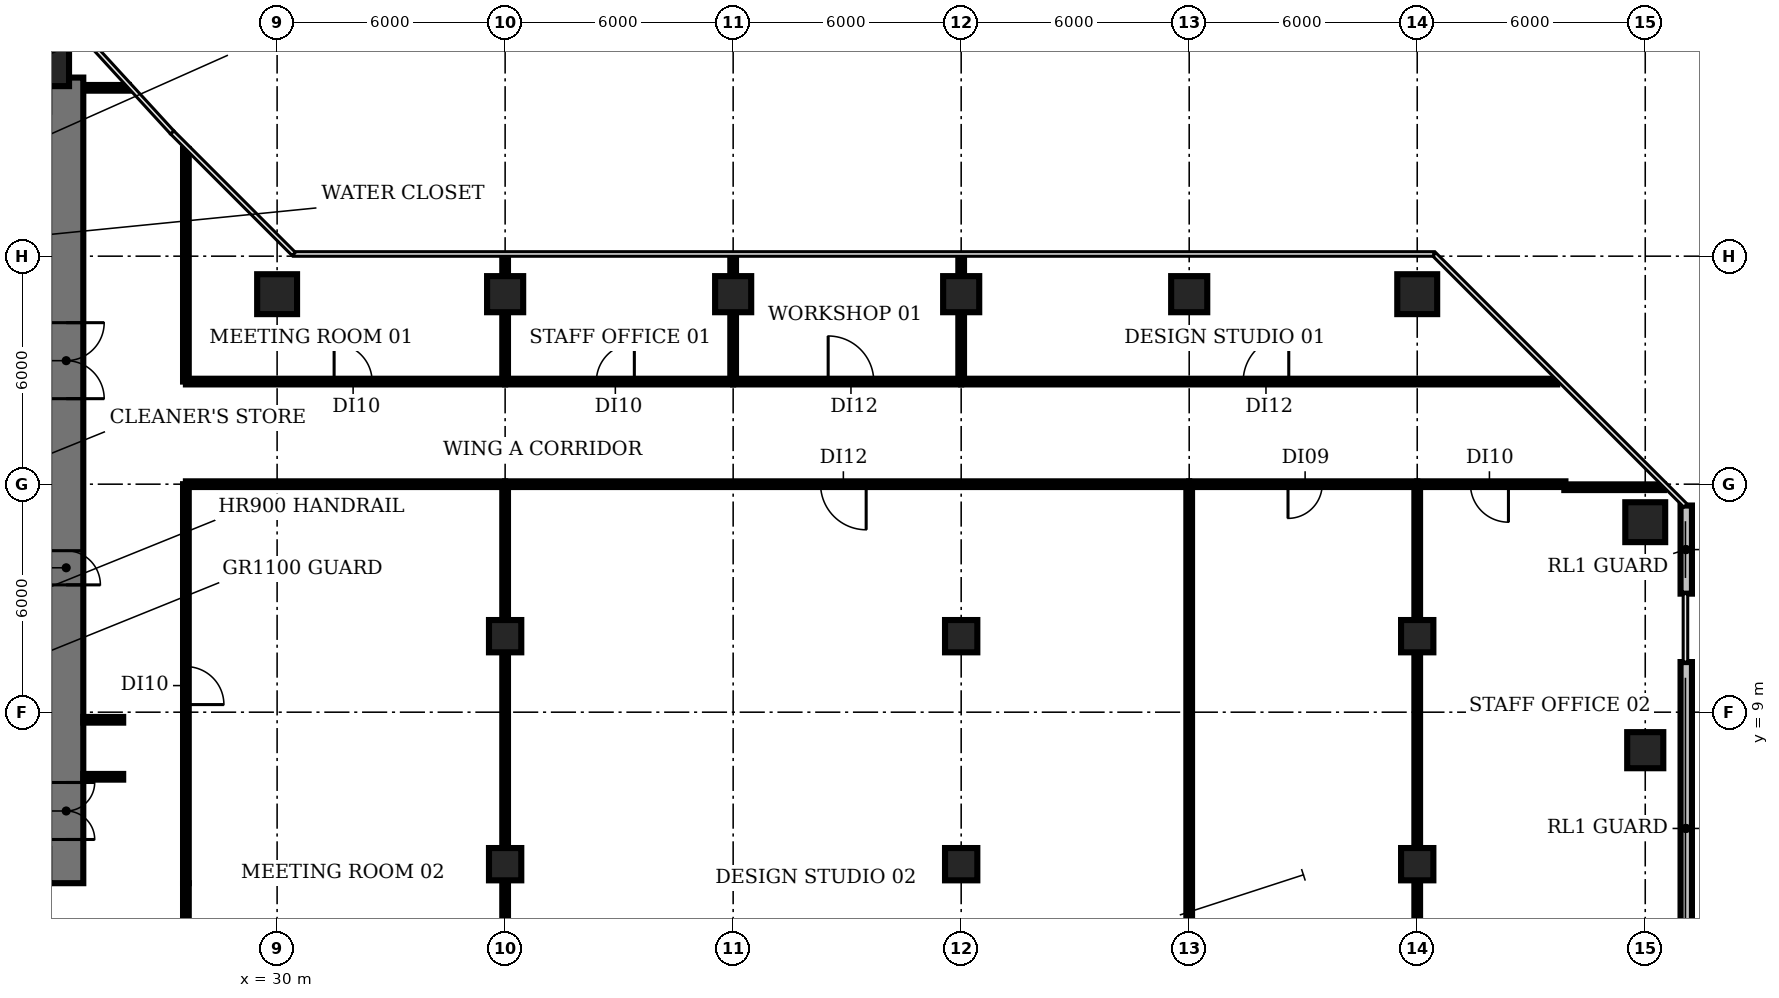
"""IFC4 building model, lengths in metres.
Left out: names, types, materials, properties, quantities, classifications, styles, units other than length and angle.
Written with IfcOpenShell. Run it as: python <this file> out.ifc"""

import sys

from ifc_helpers import new_model, si_unit, direction, frame, frame_2d, origin, origin_2d, place, context, subcontext, project, spatial, rectangle, circle, extrude, element, fill, save


model = new_model("IFC4")
c1 = context("Model", 3, precision=1e-05, world=origin(), true_north=direction((0.0, 1.0)))
c2 = subcontext(c1, "Body", "Model", "MODEL_VIEW")
j1 = project(units=[si_unit("LENGTHUNIT", "METRE"), si_unit("PLANEANGLEUNIT", "RADIAN")], contexts=[c1])
p1 = place(None, origin())
s1 = spatial("IfcSite", under=j1, at=p1, CompositionType="ELEMENT")
p2 = place(p1, origin())
s2 = spatial("IfcBuilding", under=s1, at=p2, CompositionType="ELEMENT")
p3 = place(p2, frame((0.0, 0.0, 41.6)))
s3 = spatial("IfcBuildingStorey", under=s2, at=p3, CompositionType="ELEMENT", Elevation=41.6)
for number, where, z_axis, x_axis in (
    (1, (24.0, 26.0, 0.0), (0.0, 0.0, 1.0), (1.0, 0.0, 0.0)),
    (2, (30.0, 20.0, 0.0), (0.0, 0.0, 1.0), (1.0, 0.0, 0.0)),
):
    element("IfcColumn", number, at=place(p3, frame(where, z_axis=z_axis, x_axis=x_axis)), inside=s3, PredefinedType="COLUMN", context=c2, shape_type="SweptSolid", body=[
        extrude(circle(Radius=0.525, at=origin_2d()), origin(), (0.0, 0.0, 1.0), 3.85),
    ])
for number, where, z_axis, x_axis in (
    (3, (36.0, 5.0, 0.0), (0.0, 0.0, 1.0), (1.0, 0.0, 0.0)),
    (4, (36.0, 11.0, 0.0), (0.0, 0.0, 1.0), (1.0, 0.0, 0.0)),
):
    element("IfcColumn", number, at=place(p3, frame(where, z_axis=z_axis, x_axis=x_axis)), inside=s3, PredefinedType="COLUMN", context=c2, shape_type="SweptSolid", body=[
        extrude(rectangle(XDim=0.85, YDim=0.85, at=origin_2d()), origin(), (0.0, 0.0, 1.0), 3.85),
    ])
for number, where, z_axis, x_axis in (
    (5, (36.0, 20.0, 0.0), (0.0, 0.0, 1.0), (1.0, 0.0, 0.0)),
    (6, (42.0, 20.0, 0.0), (0.0, 0.0, 1.0), (1.0, 0.0, 0.0)),
):
    element("IfcColumn", number, at=place(p3, frame(where, z_axis=z_axis, x_axis=x_axis)), inside=s3, PredefinedType="COLUMN", context=c2, shape_type="SweptSolid", body=[
        extrude(rectangle(XDim=0.95, YDim=0.95, at=origin_2d()), origin(), (0.0, 0.0, 1.0), 3.85),
    ])
for number, where, z_axis, x_axis in (
    (7, (48.0, 5.0, 0.0), (0.0, 0.0, 1.0), (1.0, 0.0, 0.0)),
    (8, (48.0, 11.0, 0.0), (0.0, 0.0, 1.0), (1.0, 0.0, 0.0)),
):
    element("IfcColumn", number, at=place(p3, frame(where, z_axis=z_axis, x_axis=x_axis)), inside=s3, PredefinedType="COLUMN", context=c2, shape_type="SweptSolid", body=[
        extrude(rectangle(XDim=0.85, YDim=0.85, at=origin_2d()), origin(), (0.0, 0.0, 1.0), 3.85),
    ])
for number, where, z_axis, x_axis in (
    (9, (48.0, 20.0, 0.0), (0.0, 0.0, 1.0), (1.0, 0.0, 0.0)),
    (10, (54.0, 20.0, 0.0), (0.0, 0.0, 1.0), (1.0, 0.0, 0.0)),
):
    element("IfcColumn", number, at=place(p3, frame(where, z_axis=z_axis, x_axis=x_axis)), inside=s3, PredefinedType="COLUMN", context=c2, shape_type="SweptSolid", body=[
        extrude(rectangle(XDim=0.95, YDim=0.95, at=origin_2d()), origin(), (0.0, 0.0, 1.0), 3.85),
    ])
for number, where, z_axis, x_axis in (
    (11, (60.0, 5.0, 0.0), (0.0, 0.0, 1.0), (1.0, 0.0, 0.0)),
    (12, (60.0, 11.0, 0.0), (0.0, 0.0, 1.0), (1.0, 0.0, 0.0)),
):
    element("IfcColumn", number, at=place(p3, frame(where, z_axis=z_axis, x_axis=x_axis)), inside=s3, PredefinedType="COLUMN", context=c2, shape_type="SweptSolid", body=[
        extrude(rectangle(XDim=0.85, YDim=0.85, at=origin_2d()), origin(), (0.0, 0.0, 1.0), 3.85),
    ])
p4 = place(p3, frame((60.0, 20.0, 0.0), z_axis=(0.0, 0.0, 1.0), x_axis=(1.0, 0.0, 0.0)))
e13 = element("IfcColumn", 13, at=p4, inside=s3, PredefinedType="COLUMN", context=c2, shape_type="SweptSolid", body=[
    extrude(circle(Radius=0.525, at=origin_2d()), origin(), (0.0, 0.0, 1.0), 3.85),
])
p5 = place(p3, frame((66.0, 8.0, 0.0), z_axis=(0.0, 0.0, 1.0), x_axis=(1.0, 0.0, 0.0)))
e14 = element("IfcColumn", 14, at=p5, inside=s3, PredefinedType="COLUMN", context=c2, shape_type="SweptSolid", body=[
    extrude(rectangle(XDim=0.95, YDim=0.95, at=origin_2d()), origin(), (0.0, 0.0, 1.0), 3.85),
])
p6 = place(p3, frame((66.0, 14.0, 0.0), z_axis=(0.0, 0.0, 1.0), x_axis=(1.0, 0.0, 0.0)))
e15 = element("IfcColumn", 15, at=p6, inside=s3, PredefinedType="COLUMN", context=c2, shape_type="SweptSolid", body=[
    extrude(circle(Radius=0.525, at=origin_2d()), origin(), (0.0, 0.0, 1.0), 3.85),
])
p7 = place(p3, frame((67.079, 1.562, 0.0), z_axis=(0.0, 0.0, 1.0), x_axis=(0.0, 1.0, 0.0)))
e16 = element("IfcWall", 16, at=p7, inside=s3, PredefinedType="SOLIDWALL", context=c2, shape_type="SweptSolid", body=[
    extrude(rectangle(XDim=8.757, YDim=0.3, at=frame_2d((4.379, 0.0))), origin(), (0.0, 0.0, 1.0), 3.85),
])
p8 = place(p3, frame((67.079, 12.119, 0.0), z_axis=(0.0, 0.0, 1.0), x_axis=(0.0, 1.0, 0.0)))
e17 = element("IfcWall", 17, at=p8, inside=s3, PredefinedType="SOLIDWALL", context=c2, shape_type="SweptSolid", body=[
    extrude(rectangle(XDim=2.319, YDim=0.3, at=frame_2d((1.16, 0.0))), origin(), (0.0, 0.0, 1.0), 3.85),
])
p9 = place(p3, frame((24.45, 25.7, 0.0), z_axis=(0.0, 0.0, 1.0), x_axis=(0.0, -1.0, 0.0)))
e18 = element("IfcWall", 18, at=p9, inside=s3, PredefinedType="SHEAR", context=c2, shape_type="SweptSolid", body=[
    extrude(rectangle(XDim=21.2, YDim=0.9, at=frame_2d((10.6, 0.0))), origin(), (0.0, 0.0, 1.0), 3.85),
])
p10 = place(p9, frame((18.55, 0.0, 0.0)))
e19 = element("IfcOpeningElement", 19, at=p10, cuts=e18, PredefinedType="OPENING", context=c2, shape_type="SweptSolid", body=[
    extrude(rectangle(XDim=1.5, YDim=2.1, at=frame_2d((0.75, 1.05))), frame((0.0, 0.46, 0.0), z_axis=(0.0, -1.0, 0.0), x_axis=(1.0, 0.0, 0.0)), (0.0, 0.0, 1.0), 0.92),
])
p11 = place(p9, frame((12.45, 0.0, 0.0)))
e20 = element("IfcOpeningElement", 20, at=p11, cuts=e18, PredefinedType="OPENING", context=c2, shape_type="SweptSolid", body=[
    extrude(rectangle(XDim=0.9, YDim=2.1, at=frame_2d((0.45, 1.05))), frame((0.0, 0.46, 0.0), z_axis=(0.0, -1.0, 0.0), x_axis=(1.0, 0.0, 0.0)), (0.0, 0.0, 1.0), 0.92),
])
p12 = place(p9, frame((6.45, 0.0, 0.0)))
e21 = element("IfcOpeningElement", 21, at=p12, cuts=e18, PredefinedType="OPENING", context=c2, shape_type="SweptSolid", body=[
    extrude(rectangle(XDim=2.0, YDim=2.1, at=frame_2d((1.0, 1.05))), frame((0.0, 0.46, 0.0), z_axis=(0.0, -1.0, 0.0), x_axis=(1.0, 0.0, 0.0)), (0.0, 0.0, 1.0), 0.92),
])
for number, where, z_axis, x_axis in (
    (22, (24.9, 7.3, 0.0), (0.0, 0.0, 1.0), (1.0, 0.0, 0.0)),
    (23, (24.9, 8.8, 0.0), (0.0, 0.0, 1.0), (1.0, 0.0, 0.0)),
):
    element("IfcWall", number, at=place(p3, frame(where, z_axis=z_axis, x_axis=x_axis)), inside=s3, PredefinedType="PARTITIONING", context=c2, shape_type="SweptSolid", body=[
        extrude(rectangle(XDim=1.05, YDim=0.15, at=frame_2d((0.525, 0.0))), origin(), (0.0, 0.0, 1.0), 2.83),
    ])
p13 = place(p3, frame((25.0, 25.43, 0.0), z_axis=(0.0, 0.0, 1.0), x_axis=(1.0, 0.0, 0.0)))
e24 = element("IfcWall", 24, at=p13, inside=s3, PredefinedType="PARTITIONING", context=c2, shape_type="SweptSolid", body=[
    extrude(rectangle(XDim=1.1, YDim=0.15, at=frame_2d((0.55, 0.0))), origin(), (0.0, 0.0, 1.0), 2.83),
])
p14 = place(p3, frame((27.6, 0.6, 0.0), z_axis=(0.0, 0.0, 1.0), x_axis=(0.0, 1.0, 0.0)))
e25 = element("IfcWall", 25, at=p14, inside=s3, PredefinedType="PARTITIONING", context=c2, shape_type="SweptSolid", body=[
    extrude(rectangle(XDim=3.9, YDim=0.15, at=frame_2d((1.95, 0.0))), origin(), (0.0, 0.0, 1.0), 2.83),
])
p15 = place(p3, frame((27.6, 15.0, 0.0), z_axis=(0.0, 0.0, 1.0), x_axis=(0.0, -1.0, 0.0)))
e26 = element("IfcWall", 26, at=p15, inside=s3, PredefinedType="PARTITIONING", context=c2, shape_type="SweptSolid", body=[
    extrude(rectangle(XDim=10.5, YDim=0.15, at=frame_2d((5.25, 0.0))), origin(), (0.0, 0.0, 1.0), 2.83),
])
p16 = place(p15, frame((4.8, 0.0, 0.0)))
e27 = element("IfcOpeningElement", 27, at=p16, cuts=e26, PredefinedType="OPENING", context=c2, shape_type="SweptSolid", body=[
    extrude(rectangle(XDim=1.0, YDim=2.1, at=frame_2d((0.5, 1.05))), frame((0.0, 0.085, 0.0), z_axis=(0.0, -1.0, 0.0), x_axis=(1.0, 0.0, 0.0)), (0.0, 0.0, 1.0), 0.17),
])
p17 = place(p3, frame((27.6, 15.0, 0.0), z_axis=(0.0, 0.0, 1.0), x_axis=(1.0, 0.0, 0.0)))
e28 = element("IfcWall", 28, at=p17, inside=s3, PredefinedType="PARTITIONING", context=c2, shape_type="SweptSolid", body=[
    extrude(rectangle(XDim=8.4, YDim=0.15, at=frame_2d((4.2, 0.0))), origin(), (0.0, 0.0, 1.0), 2.83),
])
p18 = place(p3, frame((27.6, 17.7, 0.0), z_axis=(0.0, 0.0, 1.0), x_axis=(0.0, 1.0, 0.0)))
e29 = element("IfcWall", 29, at=p18, inside=s3, PredefinedType="PARTITIONING", context=c2, shape_type="SweptSolid", body=[
    extrude(rectangle(XDim=6.12, YDim=0.15, at=frame_2d((3.06, 0.0))), origin(), (0.0, 0.0, 1.0), 2.83),
])
p19 = place(p3, frame((27.6, 17.7, 0.0), z_axis=(0.0, 0.0, 1.0), x_axis=(1.0, 0.0, 0.0)))
e30 = element("IfcWall", 30, at=p19, inside=s3, PredefinedType="PARTITIONING", context=c2, shape_type="SweptSolid", body=[
    extrude(rectangle(XDim=8.4, YDim=0.15, at=frame_2d((4.2, 0.0))), origin(), (0.0, 0.0, 1.0), 2.83),
])
p20 = place(p19, frame((3.9, 0.0, 0.0)))
e31 = element("IfcOpeningElement", 31, at=p20, cuts=e30, PredefinedType="OPENING", context=c2, shape_type="SweptSolid", body=[
    extrude(rectangle(XDim=1.0, YDim=2.1, at=frame_2d((0.5, 1.05))), frame((0.0, 0.085, 0.0), z_axis=(0.0, -1.0, 0.0), x_axis=(1.0, 0.0, 0.0)), (0.0, 0.0, 1.0), 0.17),
])
p21 = place(p3, frame((36.0, -5.42, 0.0), z_axis=(0.0, 0.0, 1.0), x_axis=(0.0, 1.0, 0.0)))
e32 = element("IfcWall", 32, at=p21, inside=s3, PredefinedType="PARTITIONING", context=c2, shape_type="SweptSolid", body=[
    extrude(rectangle(XDim=20.42, YDim=0.15, at=frame_2d((10.21, 0.0))), origin(), (0.0, 0.0, 1.0), 2.83),
])
p22 = place(p3, frame((36.0, 17.7, 0.0), z_axis=(0.0, 0.0, 1.0), x_axis=(0.0, 1.0, 0.0)))
e33 = element("IfcWall", 33, at=p22, inside=s3, PredefinedType="PARTITIONING", context=c2, shape_type="SweptSolid", body=[
    extrude(rectangle(XDim=3.31, YDim=0.15, at=frame_2d((1.655, 0.0))), origin(), (0.0, 0.0, 1.0), 2.83),
])
p23 = place(p3, frame((36.0, 17.7, 0.0), z_axis=(0.0, 0.0, 1.0), x_axis=(1.0, 0.0, 0.0)))
e34 = element("IfcWall", 34, at=p23, inside=s3, PredefinedType="PARTITIONING", context=c2, shape_type="SweptSolid", body=[
    extrude(rectangle(XDim=6.0, YDim=0.15, at=frame_2d((3.0, 0.0))), origin(), (0.0, 0.0, 1.0), 2.83),
])
p24 = place(p23, frame((2.4, 0.0, 0.0)))
e35 = element("IfcOpeningElement", 35, at=p24, cuts=e34, PredefinedType="OPENING", context=c2, shape_type="SweptSolid", body=[
    extrude(rectangle(XDim=1.0, YDim=2.1, at=frame_2d((0.5, 1.05))), frame((0.0, 0.085, 0.0), z_axis=(0.0, -1.0, 0.0), x_axis=(1.0, 0.0, 0.0)), (0.0, 0.0, 1.0), 0.17),
])
p25 = place(p3, frame((42.0, 17.7, 0.0), z_axis=(0.0, 0.0, 1.0), x_axis=(0.0, 1.0, 0.0)))
e36 = element("IfcWall", 36, at=p25, inside=s3, PredefinedType="PARTITIONING", context=c2, shape_type="SweptSolid", body=[
    extrude(rectangle(XDim=3.31, YDim=0.15, at=frame_2d((1.655, 0.0))), origin(), (0.0, 0.0, 1.0), 2.83),
])
p26 = place(p3, frame((42.0, 17.7, 0.0), z_axis=(0.0, 0.0, 1.0), x_axis=(1.0, 0.0, 0.0)))
e37 = element("IfcWall", 37, at=p26, inside=s3, PredefinedType="PARTITIONING", context=c2, shape_type="SweptSolid", body=[
    extrude(rectangle(XDim=6.0, YDim=0.15, at=frame_2d((3.0, 0.0))), origin(), (0.0, 0.0, 1.0), 2.83),
])
p27 = place(p26, frame((2.5, 0.0, 0.0)))
e38 = element("IfcOpeningElement", 38, at=p27, cuts=e37, PredefinedType="OPENING", context=c2, shape_type="SweptSolid", body=[
    extrude(rectangle(XDim=1.2, YDim=2.1, at=frame_2d((0.6, 1.05))), frame((0.0, 0.085, 0.0), z_axis=(0.0, -1.0, 0.0), x_axis=(1.0, 0.0, 0.0)), (0.0, 0.0, 1.0), 0.17),
])
p28 = place(p3, frame((48.0, 17.7, 0.0), z_axis=(0.0, 0.0, 1.0), x_axis=(0.0, 1.0, 0.0)))
e39 = element("IfcWall", 39, at=p28, inside=s3, PredefinedType="PARTITIONING", context=c2, shape_type="SweptSolid", body=[
    extrude(rectangle(XDim=3.31, YDim=0.15, at=frame_2d((1.655, 0.0))), origin(), (0.0, 0.0, 1.0), 2.83),
])
p29 = place(p3, frame((48.0, 17.7, 0.0), z_axis=(0.0, 0.0, 1.0), x_axis=(1.0, 0.0, 0.0)))
e40 = element("IfcWall", 40, at=p29, inside=s3, PredefinedType="PARTITIONING", context=c2, shape_type="SweptSolid", body=[
    extrude(rectangle(XDim=15.683, YDim=0.15, at=frame_2d((7.842, 0.0))), origin(), (0.0, 0.0, 1.0), 2.83),
])
p30 = place(p29, frame((7.42, 0.0, 0.0)))
e41 = element("IfcOpeningElement", 41, at=p30, cuts=e40, PredefinedType="OPENING", context=c2, shape_type="SweptSolid", body=[
    extrude(rectangle(XDim=1.2, YDim=2.1, at=frame_2d((0.6, 1.05))), frame((0.0, 0.085, 0.0), z_axis=(0.0, -1.0, 0.0), x_axis=(1.0, 0.0, 0.0)), (0.0, 0.0, 1.0), 0.17),
])
p31 = place(p3, frame((54.0, -6.2, 0.0), z_axis=(0.0, 0.0, 1.0), x_axis=(0.0, 1.0, 0.0)))
e42 = element("IfcWall", 42, at=p31, inside=s3, PredefinedType="PARTITIONING", context=c2, shape_type="SweptSolid", body=[
    extrude(rectangle(XDim=21.2, YDim=0.15, at=frame_2d((10.6, 0.0))), origin(), (0.0, 0.0, 1.0), 2.83),
])
p32 = place(p3, frame((54.0, 15.0, 0.0), z_axis=(0.0, 0.0, 1.0), x_axis=(-1.0, 0.0, 0.0)))
e43 = element("IfcWall", 43, at=p32, inside=s3, PredefinedType="PARTITIONING", context=c2, shape_type="SweptSolid", body=[
    extrude(rectangle(XDim=18.0, YDim=0.15, at=frame_2d((9.0, 0.0))), origin(), (0.0, 0.0, 1.0), 2.83),
])
p33 = place(p32, frame((8.5, 0.0, 0.0)))
e44 = element("IfcOpeningElement", 44, at=p33, cuts=e43, PredefinedType="OPENING", context=c2, shape_type="SweptSolid", body=[
    extrude(rectangle(XDim=1.2, YDim=2.1, at=frame_2d((0.6, 1.05))), frame((0.0, 0.085, 0.0), z_axis=(0.0, -1.0, 0.0), x_axis=(1.0, 0.0, 0.0)), (0.0, 0.0, 1.0), 0.17),
])
p34 = place(p3, frame((60.0, -5.52, 0.0), z_axis=(0.0, 0.0, 1.0), x_axis=(0.0, 1.0, 0.0)))
e45 = element("IfcWall", 45, at=p34, inside=s3, PredefinedType="PARTITIONING", context=c2, shape_type="SweptSolid", body=[
    extrude(rectangle(XDim=20.52, YDim=0.15, at=frame_2d((10.26, 0.0))), origin(), (0.0, 0.0, 1.0), 2.83),
])
p35 = place(p3, frame((60.0, 15.0, 0.0), z_axis=(0.0, 0.0, 1.0), x_axis=(-1.0, 0.0, 0.0)))
e46 = element("IfcWall", 46, at=p35, inside=s3, PredefinedType="PARTITIONING", context=c2, shape_type="SweptSolid", body=[
    extrude(rectangle(XDim=6.0, YDim=0.15, at=frame_2d((3.0, 0.0))), origin(), (0.0, 0.0, 1.0), 2.83),
])
p36 = place(p35, frame((2.5, 0.0, 0.0)))
e47 = element("IfcOpeningElement", 47, at=p36, cuts=e46, PredefinedType="OPENING", context=c2, shape_type="SweptSolid", body=[
    extrude(rectangle(XDim=0.9, YDim=2.1, at=frame_2d((0.45, 1.05))), frame((0.0, 0.085, 0.0), z_axis=(0.0, -1.0, 0.0), x_axis=(1.0, 0.0, 0.0)), (0.0, 0.0, 1.0), 0.17),
])
p37 = place(p3, frame((63.87, 14.92, 0.0), z_axis=(0.0, 0.0, 1.0), x_axis=(1.0, 0.0, 0.0)))
e48 = element("IfcWall", 48, at=p37, inside=s3, PredefinedType="PARTITIONING", context=c2, shape_type="SweptSolid", body=[
    extrude(rectangle(XDim=2.621, YDim=0.15, at=frame_2d((1.311, 0.0))), origin(), (0.0, 0.0, 1.0), 2.83),
])
p38 = place(p3, frame((63.9, 15.0, 0.0), z_axis=(0.0, 0.0, 1.0), x_axis=(-1.0, 0.0, 0.0)))
e49 = element("IfcWall", 49, at=p38, inside=s3, PredefinedType="PARTITIONING", context=c2, shape_type="SweptSolid", body=[
    extrude(rectangle(XDim=3.9, YDim=0.15, at=frame_2d((1.95, 0.0))), origin(), (0.0, 0.0, 1.0), 2.83),
])
p39 = place(p38, frame((1.5, 0.0, 0.0)))
e50 = element("IfcOpeningElement", 50, at=p39, cuts=e49, PredefinedType="OPENING", context=c2, shape_type="SweptSolid", body=[
    extrude(rectangle(XDim=1.0, YDim=2.1, at=frame_2d((0.5, 1.05))), frame((0.0, 0.085, 0.0), z_axis=(0.0, -1.0, 0.0), x_axis=(1.0, 0.0, 0.0)), (0.0, 0.0, 1.0), 0.17),
])
p40 = place(p10, origin())
e51 = element("IfcDoor", 51, at=p40, inside=s3, OperationType="DOUBLE_DOOR_SINGLE_SWING", PredefinedType="DOOR", context=c2, shape_type="SweptSolid", body=[
    extrude(rectangle(XDim=1.5, YDim=2.1, at=frame_2d((0.75, 1.05))), frame((0.0, 0.025, 0.0), z_axis=(0.0, -1.0, 0.0), x_axis=(1.0, 0.0, 0.0)), (0.0, 0.0, 1.0), 0.05),
])
fill(e19, e51)
p41 = place(p12, origin())
e52 = element("IfcDoor", 52, at=p41, inside=s3, OperationType="DOUBLE_DOOR_SINGLE_SWING", PredefinedType="DOOR", context=c2, shape_type="SweptSolid", body=[
    extrude(rectangle(XDim=2.0, YDim=2.1, at=frame_2d((1.0, 1.05))), frame((0.0, 0.025, 0.0), z_axis=(0.0, -1.0, 0.0), x_axis=(1.0, 0.0, 0.0)), (0.0, 0.0, 1.0), 0.05),
])
fill(e21, e52)
p42 = place(p16, origin())
e53 = element("IfcDoor", 53, at=p42, inside=s3, OperationType="SINGLE_SWING_RIGHT", PredefinedType="DOOR", context=c2, shape_type="SweptSolid", body=[
    extrude(rectangle(XDim=1.0, YDim=2.1, at=frame_2d((0.5, 1.05))), frame((0.0, 0.025, 0.0), z_axis=(0.0, -1.0, 0.0), x_axis=(1.0, 0.0, 0.0)), (0.0, 0.0, 1.0), 0.05),
])
fill(e27, e53)
p43 = place(p20, origin())
e54 = element("IfcDoor", 54, at=p43, inside=s3, OperationType="SINGLE_SWING_LEFT", PredefinedType="DOOR", context=c2, shape_type="SweptSolid", body=[
    extrude(rectangle(XDim=1.0, YDim=2.1, at=frame_2d((0.5, 1.05))), frame((0.0, 0.025, 0.0), z_axis=(0.0, -1.0, 0.0), x_axis=(1.0, 0.0, 0.0)), (0.0, 0.0, 1.0), 0.05),
])
fill(e31, e54)
p44 = place(p24, origin())
e55 = element("IfcDoor", 55, at=p44, inside=s3, OperationType="SINGLE_SWING_RIGHT", PredefinedType="DOOR", context=c2, shape_type="SweptSolid", body=[
    extrude(rectangle(XDim=1.0, YDim=2.1, at=frame_2d((0.5, 1.05))), frame((0.0, 0.025, 0.0), z_axis=(0.0, -1.0, 0.0), x_axis=(1.0, 0.0, 0.0)), (0.0, 0.0, 1.0), 0.05),
])
fill(e35, e55)
p45 = place(p27, origin())
e56 = element("IfcDoor", 56, at=p45, inside=s3, OperationType="SINGLE_SWING_LEFT", PredefinedType="DOOR", context=c2, shape_type="SweptSolid", body=[
    extrude(rectangle(XDim=1.2, YDim=2.1, at=frame_2d((0.6, 1.05))), frame((0.0, 0.025, 0.0), z_axis=(0.0, -1.0, 0.0), x_axis=(1.0, 0.0, 0.0)), (0.0, 0.0, 1.0), 0.05),
])
fill(e38, e56)
p46 = place(p30, origin())
e57 = element("IfcDoor", 57, at=p46, inside=s3, OperationType="SINGLE_SWING_RIGHT", PredefinedType="DOOR", context=c2, shape_type="SweptSolid", body=[
    extrude(rectangle(XDim=1.2, YDim=2.1, at=frame_2d((0.6, 1.05))), frame((0.0, 0.025, 0.0), z_axis=(0.0, -1.0, 0.0), x_axis=(1.0, 0.0, 0.0)), (0.0, 0.0, 1.0), 0.05),
])
fill(e41, e57)
p47 = place(p33, origin())
e58 = element("IfcDoor", 58, at=p47, inside=s3, OperationType="SINGLE_SWING_LEFT", PredefinedType="DOOR", context=c2, shape_type="SweptSolid", body=[
    extrude(rectangle(XDim=1.2, YDim=2.1, at=frame_2d((0.6, 1.05))), frame((0.0, 0.025, 0.0), z_axis=(0.0, -1.0, 0.0), x_axis=(1.0, 0.0, 0.0)), (0.0, 0.0, 1.0), 0.05),
])
fill(e44, e58)
p48 = place(p36, origin())
e59 = element("IfcDoor", 59, at=p48, inside=s3, OperationType="SINGLE_SWING_RIGHT", PredefinedType="DOOR", context=c2, shape_type="SweptSolid", body=[
    extrude(rectangle(XDim=0.9, YDim=2.1, at=frame_2d((0.45, 1.05))), frame((0.0, 0.025, 0.0), z_axis=(0.0, -1.0, 0.0), x_axis=(1.0, 0.0, 0.0)), (0.0, 0.0, 1.0), 0.05),
])
fill(e47, e59)
p49 = place(p39, origin())
e60 = element("IfcDoor", 60, at=p49, inside=s3, OperationType="SINGLE_SWING_LEFT", PredefinedType="DOOR", context=c2, shape_type="SweptSolid", body=[
    extrude(rectangle(XDim=1.0, YDim=2.1, at=frame_2d((0.5, 1.05))), frame((0.0, 0.025, 0.0), z_axis=(0.0, -1.0, 0.0), x_axis=(1.0, 0.0, 0.0)), (0.0, 0.0, 1.0), 0.05),
])
fill(e50, e60)
save(model, sys.argv[1])
